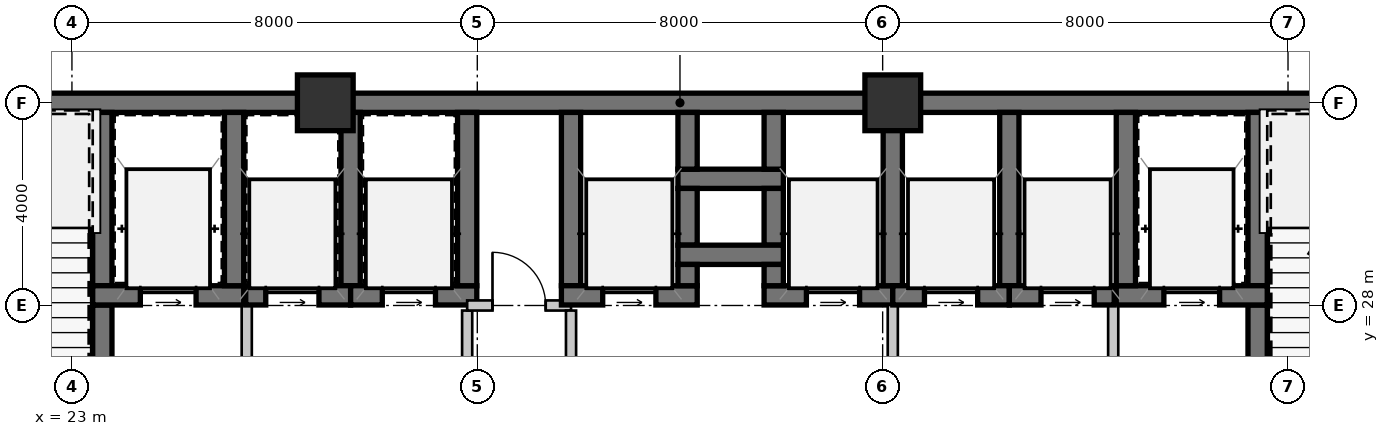
"""IFC4 building model, lengths in metres.
Left out: names, types, materials, properties, quantities, classifications, styles, units other than length and angle.
Written with IfcOpenShell. Run it as: python <this file> out.ifc"""

import sys

from ifc_helpers import new_model, si_unit, direction, frame, frame_2d, origin, origin_2d, place, context, subcontext, project, spatial, rectangle, extrude, source, transform, mapped, element, fill, save


model = new_model("IFC4")
c1 = context("Model", 3, precision=1e-05, world=origin(), true_north=direction((0.0, 1.0)))
c2 = subcontext(c1, "Body", "Model", "MODEL_VIEW")
j1 = project(units=[si_unit("LENGTHUNIT", "METRE"), si_unit("PLANEANGLEUNIT", "RADIAN")], contexts=[c1])
p1 = place(None, origin())
s1 = spatial("IfcSite", under=j1, at=p1, CompositionType="ELEMENT")
p2 = place(p1, origin())
s2 = spatial("IfcBuilding", under=s1, at=p2, CompositionType="ELEMENT")
p3 = place(p2, origin())
s3 = spatial("IfcBuildingStorey", under=s2, at=p3, CompositionType="ELEMENT", Elevation=0.0)
m1 = source(origin(), c2, "Body", "SweptSolid", [
    extrude(rectangle(XDim=1.1, YDim=1.1, at=origin_2d()), origin(), (0.0, 0.0, 1.0), 4.55),
])
for number, where, z_axis, x_axis in (
    (1, (28.0, 32.0, 0.0), (0.0, 0.0, 1.0), (1.0, 0.0, 0.0)),
    (2, (39.2, 32.0, 0.0), (0.0, 0.0, 1.0), (1.0, 0.0, 0.0)),
):
    element("IfcColumn", number, at=place(p3, frame(where, z_axis=z_axis, x_axis=x_axis)), inside=s3, PredefinedType="COLUMN", context=c2, shape_type="MappedRepresentation", body=[
        mapped(m1, transform((0.0, 0.0, 0.0), scale=1.0)),
    ])
m2 = source(origin(), c2, "Body", "SweptSolid", [
    extrude(rectangle(XDim=9.19, YDim=0.38, at=frame_2d((4.595, 0.0))), origin(), (0.0, 0.0, 1.0), 4.29),
])
p4 = place(p3, frame((18.81, 32.0, 0.0), z_axis=(0.0, 0.0, 1.0), x_axis=(1.0, 0.0, 0.0)))
e3 = element("IfcWall", 3, at=p4, inside=s3, PredefinedType="SHEAR", context=c2, shape_type="MappedRepresentation", body=[
    mapped(m2, transform((0.0, 0.0, 0.0), scale=1.0)),
])
m3 = source(origin(), c2, "Body", "SweptSolid", [
    extrude(rectangle(XDim=11.2, YDim=0.38, at=frame_2d((5.6, 0.0))), origin(), (0.0, 0.0, 1.0), 4.29),
])
p5 = place(p3, frame((28.0, 32.0, 0.0), z_axis=(0.0, 0.0, 1.0), x_axis=(1.0, 0.0, 0.0)))
e4 = element("IfcWall", 4, at=p5, inside=s3, PredefinedType="SHEAR", context=c2, shape_type="MappedRepresentation", body=[
    mapped(m3, transform((0.0, 0.0, 0.0), scale=1.0)),
])
m4 = source(origin(), c2, "Body", "SweptSolid", [
    extrude(rectangle(XDim=11.99, YDim=0.38, at=frame_2d((5.995, 0.0))), origin(), (0.0, 0.0, 1.0), 4.29),
])
p6 = place(p3, frame((39.2, 32.0, 0.0), z_axis=(0.0, 0.0, 1.0), x_axis=(1.0, 0.0, 0.0)))
e5 = element("IfcWall", 5, at=p6, inside=s3, PredefinedType="SHEAR", context=c2, shape_type="MappedRepresentation", body=[
    mapped(m4, transform((0.0, 0.0, 0.0), scale=1.0)),
])
m5 = source(origin(), c2, "Body", "SweptSolid", [
    extrude(rectangle(XDim=3.42, YDim=0.38, at=frame_2d((1.71, 0.0))), origin(), (0.0, 0.0, 1.0), 4.29),
])
p7 = place(p3, frame((23.6, 28.39, 0.0), z_axis=(0.0, 0.0, 1.0), x_axis=(0.0, 1.0, 0.0)))
e6 = element("IfcWall", 6, at=p7, inside=s3, PredefinedType="SHEAR", context=c2, shape_type="MappedRepresentation", body=[
    mapped(m5, transform((0.0, 0.0, 0.0), scale=1.0)),
])
m6 = source(origin(), c2, "Body", "SweptSolid", [
    extrude(rectangle(XDim=3.82, YDim=0.38, at=frame_2d((1.91, 0.0))), origin(), (0.0, 0.0, 1.0), 4.29),
])
p8 = place(p3, frame((23.6, 24.19, 0.0), z_axis=(0.0, 0.0, 1.0), x_axis=(0.0, 1.0, 0.0)))
e7 = element("IfcWall", 7, at=p8, inside=s3, PredefinedType="SHEAR", context=c2, shape_type="MappedRepresentation", body=[
    mapped(m6, transform((0.0, 0.0, 0.0), scale=1.0)),
])
m7 = source(origin(), c2, "Body", "SweptSolid", [
    extrude(rectangle(XDim=1.05, YDim=2.1, at=frame_2d((0.525, 1.05))), frame((0.0, 0.2, 0.0), z_axis=(0.0, -1.0, 0.0), x_axis=(1.0, 0.0, 0.0)), (0.0, 0.0, 1.0), 0.4),
])
p9 = place(p8, frame((0.685, 0.0, 0.0)))
e8 = element("IfcOpeningElement", 8, at=p9, cuts=e7, PredefinedType="OPENING", context=c2, shape_type="MappedRepresentation", body=[
    mapped(m7, transform((0.0, 0.0, 0.0), scale=1.0)),
])
m8 = source(origin(), c2, "Body", "SweptSolid", [
    extrude(rectangle(XDim=2.98, YDim=0.38, at=frame_2d((1.49, 0.0))), origin(), (0.0, 0.0, 1.0), 4.29),
])
p10 = place(p3, frame((23.41, 28.2, 0.0), z_axis=(0.0, 0.0, 1.0), x_axis=(1.0, 0.0, 0.0)))
e9 = element("IfcWall", 9, at=p10, inside=s3, PredefinedType="SHEAR", context=c2, shape_type="MappedRepresentation", body=[
    mapped(m8, transform((0.0, 0.0, 0.0), scale=1.0)),
])
m9 = source(origin(), c2, "Body", "SweptSolid", [
    extrude(rectangle(XDim=1.1, YDim=2.15, at=frame_2d((0.55, 1.075))), frame((0.0, 0.2, 0.0), z_axis=(0.0, -1.0, 0.0), x_axis=(1.0, 0.0, 0.0)), (0.0, 0.0, 1.0), 0.4),
])
p11 = place(p10, frame((0.94, 0.0, 0.0)))
e10 = element("IfcOpeningElement", 10, at=p11, cuts=e9, PredefinedType="OPENING", context=c2, shape_type="MappedRepresentation", body=[
    mapped(m9, transform((0.0, 0.0, 0.0), scale=1.0)),
])
p12 = place(p3, frame((26.2, 28.39, 0.0), z_axis=(0.0, 0.0, 1.0), x_axis=(0.0, 1.0, 0.0)))
e11 = element("IfcWall", 11, at=p12, inside=s3, PredefinedType="SHEAR", context=c2, shape_type="MappedRepresentation", body=[
    mapped(m5, transform((0.0, 0.0, 0.0), scale=1.0)),
])
m10 = source(origin(), c2, "Body", "SweptSolid", [
    extrude(rectangle(XDim=3.91, YDim=0.2, at=frame_2d((1.955, 0.0))), origin(), (0.0, 0.0, 1.0), 4.29),
])
p13 = place(p3, frame((26.45, 24.1, 0.0), z_axis=(0.0, 0.0, 1.0), x_axis=(0.0, 1.0, 0.0)))
e12 = element("IfcWall", 12, at=p13, inside=s3, PredefinedType="SOLIDWALL", context=c2, shape_type="MappedRepresentation", body=[
    mapped(m10, transform((0.0, 0.0, 0.0), scale=1.0)),
])
p14 = place(p3, frame((46.4, 31.81, 0.0), z_axis=(0.0, 0.0, 1.0), x_axis=(0.0, -1.0, 0.0)))
e13 = element("IfcWall", 13, at=p14, inside=s3, PredefinedType="SHEAR", context=c2, shape_type="MappedRepresentation", body=[
    mapped(m5, transform((0.0, 0.0, 0.0), scale=1.0)),
])
p15 = place(p3, frame((46.4, 28.01, 0.0), z_axis=(0.0, 0.0, 1.0), x_axis=(0.0, -1.0, 0.0)))
e14 = element("IfcWall", 14, at=p15, inside=s3, PredefinedType="SHEAR", context=c2, shape_type="MappedRepresentation", body=[
    mapped(m6, transform((0.0, 0.0, 0.0), scale=1.0)),
])
p16 = place(p15, frame((2.085, 0.0, 0.0)))
e15 = element("IfcOpeningElement", 15, at=p16, cuts=e14, PredefinedType="OPENING", context=c2, shape_type="MappedRepresentation", body=[
    mapped(m7, transform((0.0, 0.0, 0.0), scale=1.0)),
])
p17 = place(p3, frame((43.61, 28.2, 0.0), z_axis=(0.0, 0.0, 1.0), x_axis=(1.0, 0.0, 0.0)))
e16 = element("IfcWall", 16, at=p17, inside=s3, PredefinedType="SHEAR", context=c2, shape_type="MappedRepresentation", body=[
    mapped(m8, transform((0.0, 0.0, 0.0), scale=1.0)),
])
p18 = place(p17, frame((0.94, 0.0, 0.0)))
e17 = element("IfcOpeningElement", 17, at=p18, cuts=e16, PredefinedType="OPENING", context=c2, shape_type="MappedRepresentation", body=[
    mapped(m9, transform((0.0, 0.0, 0.0), scale=1.0)),
])
p19 = place(p3, frame((43.8, 31.81, 0.0), z_axis=(0.0, 0.0, 1.0), x_axis=(0.0, -1.0, 0.0)))
e18 = element("IfcWall", 18, at=p19, inside=s3, PredefinedType="SHEAR", context=c2, shape_type="MappedRepresentation", body=[
    mapped(m5, transform((0.0, 0.0, 0.0), scale=1.0)),
])
p20 = place(p3, frame((43.55, 28.01, 0.0), z_axis=(0.0, 0.0, 1.0), x_axis=(0.0, -1.0, 0.0)))
e19 = element("IfcWall", 19, at=p20, inside=s3, PredefinedType="SOLIDWALL", context=c2, shape_type="MappedRepresentation", body=[
    mapped(m10, transform((0.0, 0.0, 0.0), scale=1.0)),
])
m11 = source(origin(), c2, "Body", "SweptSolid", [
    extrude(rectangle(XDim=2.08, YDim=0.38, at=frame_2d((1.04, 0.0))), origin(), (0.0, 0.0, 1.0), 4.29),
])
p21 = place(p3, frame((34.96, 30.5, 0.0), z_axis=(0.0, 0.0, 1.0), x_axis=(1.0, 0.0, 0.0)))
e20 = element("IfcWall", 20, at=p21, inside=s3, PredefinedType="SHEAR", context=c2, shape_type="MappedRepresentation", body=[
    mapped(m11, transform((0.0, 0.0, 0.0), scale=1.0)),
])
m12 = source(origin(), c2, "Body", "SweptSolid", [
    extrude(rectangle(XDim=1.12, YDim=0.38, at=frame_2d((0.56, 0.0))), origin(), (0.0, 0.0, 1.0), 4.29),
])
for number, where, z_axis, x_axis in (
    (21, (35.15, 31.81, 0.0), (0.0, 0.0, 1.0), (0.0, -1.0, 0.0)),
    (22, (36.85, 30.69, 0.0), (0.0, 0.0, 1.0), (0.0, 1.0, 0.0)),
    (23, (35.15, 30.31, 0.0), (0.0, 0.0, 1.0), (0.0, -1.0, 0.0)),
    (24, (36.85, 29.19, 0.0), (0.0, 0.0, 1.0), (0.0, 1.0, 0.0)),
):
    element("IfcWall", number, at=place(p3, frame(where, z_axis=z_axis, x_axis=x_axis)), inside=s3, PredefinedType="SHEAR", context=c2, shape_type="MappedRepresentation", body=[
        mapped(m12, transform((0.0, 0.0, 0.0), scale=1.0)),
    ])
p22 = place(p3, frame((34.96, 29.0, 0.0), z_axis=(0.0, 0.0, 1.0), x_axis=(1.0, 0.0, 0.0)))
e25 = element("IfcWall", 25, at=p22, inside=s3, PredefinedType="SHEAR", context=c2, shape_type="MappedRepresentation", body=[
    mapped(m11, transform((0.0, 0.0, 0.0), scale=1.0)),
])
p23 = place(p3, frame((28.5, 28.39, 0.0), z_axis=(0.0, 0.0, 1.0), x_axis=(0.0, 1.0, 0.0)))
e26 = element("IfcWall", 26, at=p23, inside=s3, PredefinedType="SHEAR", context=c2, shape_type="MappedRepresentation", body=[
    mapped(m5, transform((0.0, 0.0, 0.0), scale=1.0)),
])
m13 = source(origin(), c2, "Body", "SweptSolid", [
    extrude(rectangle(XDim=2.07, YDim=0.38, at=frame_2d((1.035, 0.0))), origin(), (0.0, 0.0, 1.0), 4.29),
])
p24 = place(p3, frame((26.43, 28.2, 0.0), z_axis=(0.0, 0.0, 1.0), x_axis=(1.0, 0.0, 0.0)))
e27 = element("IfcWall", 27, at=p24, inside=s3, PredefinedType="SHEAR", context=c2, shape_type="MappedRepresentation", body=[
    mapped(m13, transform((0.0, 0.0, 0.0), scale=1.0)),
])
m14 = source(origin(), c2, "Body", "SweptSolid", [
    extrude(rectangle(XDim=1.05, YDim=2.15, at=frame_2d((0.525, 1.075))), frame((0.0, 0.2, 0.0), z_axis=(0.0, -1.0, 0.0), x_axis=(1.0, 0.0, 0.0)), (0.0, 0.0, 1.0), 0.4),
])
p25 = place(p24, frame((0.395, 0.0, 0.0)))
e28 = element("IfcOpeningElement", 28, at=p25, cuts=e27, PredefinedType="OPENING", context=c2, shape_type="MappedRepresentation", body=[
    mapped(m14, transform((0.0, 0.0, 0.0), scale=1.0)),
])
m15 = source(origin(), c2, "Body", "SweptSolid", [
    extrude(rectangle(XDim=2.49, YDim=0.38, at=frame_2d((1.245, 0.0))), origin(), (0.0, 0.0, 1.0), 4.29),
])
p26 = place(p3, frame((28.5, 28.2, 0.0), z_axis=(0.0, 0.0, 1.0), x_axis=(1.0, 0.0, 0.0)))
e29 = element("IfcWall", 29, at=p26, inside=s3, PredefinedType="SHEAR", context=c2, shape_type="MappedRepresentation", body=[
    mapped(m15, transform((0.0, 0.0, 0.0), scale=1.0)),
])
p27 = place(p26, frame((0.625, 0.0, 0.0)))
e30 = element("IfcOpeningElement", 30, at=p27, cuts=e29, PredefinedType="OPENING", context=c2, shape_type="MappedRepresentation", body=[
    mapped(m14, transform((0.0, 0.0, 0.0), scale=1.0)),
])
p28 = place(p3, frame((30.8, 28.39, 0.0), z_axis=(0.0, 0.0, 1.0), x_axis=(0.0, 1.0, 0.0)))
e31 = element("IfcWall", 31, at=p28, inside=s3, PredefinedType="SHEAR", context=c2, shape_type="MappedRepresentation", body=[
    mapped(m5, transform((0.0, 0.0, 0.0), scale=1.0)),
])
m16 = source(origin(), c2, "Body", "SweptSolid", [
    extrude(rectangle(XDim=3.8, YDim=0.2, at=frame_2d((1.9, 0.0))), origin(), (0.0, 0.0, 1.0), 4.29),
])
p29 = place(p3, frame((30.8, 27.9, 0.0), z_axis=(0.0, 0.0, 1.0), x_axis=(0.0, -1.0, 0.0)))
e32 = element("IfcWall", 32, at=p29, inside=s3, PredefinedType="SOLIDWALL", context=c2, shape_type="MappedRepresentation", body=[
    mapped(m16, transform((0.0, 0.0, 0.0), scale=1.0)),
])
m17 = source(origin(), c2, "Body", "SweptSolid", [
    extrude(rectangle(XDim=2.05, YDim=0.2, at=frame_2d((1.025, 0.0))), origin(), (0.0, 0.0, 1.0), 4.29),
])
p30 = place(p3, frame((30.8, 28.0, 0.0), z_axis=(0.0, 0.0, 1.0), x_axis=(1.0, 0.0, 0.0)))
e33 = element("IfcWall", 33, at=p30, inside=s3, PredefinedType="SOLIDWALL", context=c2, shape_type="MappedRepresentation", body=[
    mapped(m17, transform((0.0, 0.0, 0.0), scale=1.0)),
])
m18 = source(origin(), c2, "Body", "SweptSolid", [
    extrude(rectangle(XDim=1.05, YDim=2.1, at=frame_2d((0.525, 1.05))), frame((0.0, 0.11, 0.0), z_axis=(0.0, -1.0, 0.0), x_axis=(1.0, 0.0, 0.0)), (0.0, 0.0, 1.0), 0.22),
])
p31 = place(p30, frame((0.5, 0.0, 0.0)))
e34 = element("IfcOpeningElement", 34, at=p31, cuts=e33, PredefinedType="OPENING", context=c2, shape_type="MappedRepresentation", body=[
    mapped(m18, transform((0.0, 0.0, 0.0), scale=1.0)),
])
p32 = place(p3, frame((32.85, 27.9, 0.0), z_axis=(0.0, 0.0, 1.0), x_axis=(0.0, -1.0, 0.0)))
e35 = element("IfcWall", 35, at=p32, inside=s3, PredefinedType="SOLIDWALL", context=c2, shape_type="MappedRepresentation", body=[
    mapped(m16, transform((0.0, 0.0, 0.0), scale=1.0)),
])
p33 = place(p3, frame((32.85, 31.81, 0.0), z_axis=(0.0, 0.0, 1.0), x_axis=(0.0, -1.0, 0.0)))
e36 = element("IfcWall", 36, at=p33, inside=s3, PredefinedType="SHEAR", context=c2, shape_type="MappedRepresentation", body=[
    mapped(m5, transform((0.0, 0.0, 0.0), scale=1.0)),
])
m19 = source(origin(), c2, "Body", "SweptSolid", [
    extrude(rectangle(XDim=2.68, YDim=0.38, at=frame_2d((1.34, 0.0))), origin(), (0.0, 0.0, 1.0), 4.29),
])
p34 = place(p3, frame((32.66, 28.2, 0.0), z_axis=(0.0, 0.0, 1.0), x_axis=(1.0, 0.0, 0.0)))
e37 = element("IfcWall", 37, at=p34, inside=s3, PredefinedType="SHEAR", context=c2, shape_type="MappedRepresentation", body=[
    mapped(m19, transform((0.0, 0.0, 0.0), scale=1.0)),
])
p35 = place(p34, frame((0.815, 0.0, 0.0)))
e38 = element("IfcOpeningElement", 38, at=p35, cuts=e37, PredefinedType="OPENING", context=c2, shape_type="MappedRepresentation", body=[
    mapped(m14, transform((0.0, 0.0, 0.0), scale=1.0)),
])
m20 = source(origin(), c2, "Body", "SweptSolid", [
    extrude(rectangle(XDim=0.42, YDim=0.38, at=frame_2d((0.21, 0.0))), origin(), (0.0, 0.0, 1.0), 4.29),
])
p36 = place(p3, frame((35.15, 28.39, 0.0), z_axis=(0.0, 0.0, 1.0), x_axis=(0.0, 1.0, 0.0)))
e39 = element("IfcWall", 39, at=p36, inside=s3, PredefinedType="SHEAR", context=c2, shape_type="MappedRepresentation", body=[
    mapped(m20, transform((0.0, 0.0, 0.0), scale=1.0)),
])
m21 = source(origin(), c2, "Body", "SweptSolid", [
    extrude(rectangle(XDim=2.54, YDim=0.38, at=frame_2d((1.27, 0.0))), origin(), (0.0, 0.0, 1.0), 4.29),
])
p37 = place(p3, frame((36.66, 28.2, 0.0), z_axis=(0.0, 0.0, 1.0), x_axis=(1.0, 0.0, 0.0)))
e40 = element("IfcWall", 40, at=p37, inside=s3, PredefinedType="SHEAR", context=c2, shape_type="MappedRepresentation", body=[
    mapped(m21, transform((0.0, 0.0, 0.0), scale=1.0)),
])
p38 = place(p37, frame((0.835, 0.0, 0.0)))
e41 = element("IfcOpeningElement", 41, at=p38, cuts=e40, PredefinedType="OPENING", context=c2, shape_type="MappedRepresentation", body=[
    mapped(m14, transform((0.0, 0.0, 0.0), scale=1.0)),
])
p39 = place(p3, frame((36.85, 28.81, 0.0), z_axis=(0.0, 0.0, 1.0), x_axis=(0.0, -1.0, 0.0)))
e42 = element("IfcWall", 42, at=p39, inside=s3, PredefinedType="SHEAR", context=c2, shape_type="MappedRepresentation", body=[
    mapped(m20, transform((0.0, 0.0, 0.0), scale=1.0)),
])
p40 = place(p3, frame((39.2, 28.39, 0.0), z_axis=(0.0, 0.0, 1.0), x_axis=(0.0, 1.0, 0.0)))
e43 = element("IfcWall", 43, at=p40, inside=s3, PredefinedType="SHEAR", context=c2, shape_type="MappedRepresentation", body=[
    mapped(m5, transform((0.0, 0.0, 0.0), scale=1.0)),
])
m22 = source(origin(), c2, "Body", "SweptSolid", [
    extrude(rectangle(XDim=3.91, YDim=0.2, at=frame_2d((1.955, 0.0))), origin(), (0.0, 0.0, 1.0), 3.83),
])
p41 = place(p3, frame((39.2, 28.01, 0.0), z_axis=(0.0, 0.0, 1.0), x_axis=(0.0, -1.0, 0.0)))
e44 = element("IfcWall", 44, at=p41, inside=s3, PredefinedType="SOLIDWALL", context=c2, shape_type="MappedRepresentation", body=[
    mapped(m22, transform((0.0, 0.0, 0.0), scale=1.0)),
])
p42 = place(p3, frame((41.5, 28.39, 0.0), z_axis=(0.0, 0.0, 1.0), x_axis=(0.0, 1.0, 0.0)))
e45 = element("IfcWall", 45, at=p42, inside=s3, PredefinedType="SHEAR", context=c2, shape_type="MappedRepresentation", body=[
    mapped(m5, transform((0.0, 0.0, 0.0), scale=1.0)),
])
m23 = source(origin(), c2, "Body", "SweptSolid", [
    extrude(rectangle(XDim=2.3, YDim=0.38, at=frame_2d((1.15, 0.0))), origin(), (0.0, 0.0, 1.0), 4.29),
])
p43 = place(p3, frame((39.2, 28.2, 0.0), z_axis=(0.0, 0.0, 1.0), x_axis=(1.0, 0.0, 0.0)))
e46 = element("IfcWall", 46, at=p43, inside=s3, PredefinedType="SHEAR", context=c2, shape_type="MappedRepresentation", body=[
    mapped(m23, transform((0.0, 0.0, 0.0), scale=1.0)),
])
p44 = place(p43, frame((0.625, 0.0, 0.0)))
e47 = element("IfcOpeningElement", 47, at=p44, cuts=e46, PredefinedType="OPENING", context=c2, shape_type="MappedRepresentation", body=[
    mapped(m14, transform((0.0, 0.0, 0.0), scale=1.0)),
])
p45 = place(p3, frame((41.5, 28.2, 0.0), z_axis=(0.0, 0.0, 1.0), x_axis=(1.0, 0.0, 0.0)))
e48 = element("IfcWall", 48, at=p45, inside=s3, PredefinedType="SHEAR", context=c2, shape_type="MappedRepresentation", body=[
    mapped(m13, transform((0.0, 0.0, 0.0), scale=1.0)),
])
p46 = place(p45, frame((0.625, 0.0, 0.0)))
e49 = element("IfcOpeningElement", 49, at=p46, cuts=e48, PredefinedType="OPENING", context=c2, shape_type="MappedRepresentation", body=[
    mapped(m14, transform((0.0, 0.0, 0.0), scale=1.0)),
])
m24 = source(origin(), c2, "Body", "SweptSolid", [
    extrude(rectangle(XDim=1.1, YDim=2.15, at=frame_2d((0.55, 1.075))), frame((0.0, 0.025, 0.0), z_axis=(0.0, -1.0, 0.0), x_axis=(1.0, 0.0, 0.0)), (0.0, 0.0, 1.0), 0.05),
])
p47 = place(p11, origin())
e50 = element("IfcDoor", 50, at=p47, inside=s3, OperationType="SLIDING_TO_LEFT", PredefinedType="DOOR", context=c2, shape_type="MappedRepresentation", body=[
    mapped(m24, transform((0.0, 0.0, 0.0), scale=1.0)),
])
fill(e10, e50)
p48 = place(p18, origin())
e51 = element("IfcDoor", 51, at=p48, inside=s3, OperationType="SLIDING_TO_LEFT", PredefinedType="DOOR", context=c2, shape_type="MappedRepresentation", body=[
    mapped(m24, transform((0.0, 0.0, 0.0), scale=1.0)),
])
fill(e17, e51)
m25 = source(origin(), c2, "Body", "SweptSolid", [
    extrude(rectangle(XDim=1.05, YDim=2.15, at=frame_2d((0.525, 1.075))), frame((0.0, 0.025, 0.0), z_axis=(0.0, -1.0, 0.0), x_axis=(1.0, 0.0, 0.0)), (0.0, 0.0, 1.0), 0.05),
])
p49 = place(p25, origin())
e52 = element("IfcDoor", 52, at=p49, inside=s3, OperationType="SLIDING_TO_LEFT", PredefinedType="DOOR", context=c2, shape_type="MappedRepresentation", body=[
    mapped(m25, transform((0.0, 0.0, 0.0), scale=1.0)),
])
fill(e28, e52)
p50 = place(p27, origin())
e53 = element("IfcDoor", 53, at=p50, inside=s3, OperationType="SLIDING_TO_LEFT", PredefinedType="DOOR", context=c2, shape_type="MappedRepresentation", body=[
    mapped(m25, transform((0.0, 0.0, 0.0), scale=1.0)),
])
fill(e30, e53)
m26 = source(origin(), c2, "Body", "SweptSolid", [
    extrude(rectangle(XDim=1.05, YDim=2.1, at=frame_2d((0.525, 1.05))), frame((0.0, 0.025, 0.0), z_axis=(0.0, -1.0, 0.0), x_axis=(1.0, 0.0, 0.0)), (0.0, 0.0, 1.0), 0.05),
])
p51 = place(p31, origin())
e54 = element("IfcDoor", 54, at=p51, inside=s3, OperationType="SINGLE_SWING_LEFT", PredefinedType="DOOR", context=c2, shape_type="MappedRepresentation", body=[
    mapped(m26, transform((0.0, 0.0, 0.0), scale=1.0)),
])
fill(e34, e54)
p52 = place(p35, origin())
e55 = element("IfcDoor", 55, at=p52, inside=s3, OperationType="SLIDING_TO_LEFT", PredefinedType="DOOR", context=c2, shape_type="MappedRepresentation", body=[
    mapped(m25, transform((0.0, 0.0, 0.0), scale=1.0)),
])
fill(e38, e55)
p53 = place(p38, origin())
e56 = element("IfcDoor", 56, at=p53, inside=s3, OperationType="SLIDING_TO_LEFT", PredefinedType="DOOR", context=c2, shape_type="MappedRepresentation", body=[
    mapped(m25, transform((0.0, 0.0, 0.0), scale=1.0)),
])
fill(e41, e56)
p54 = place(p44, origin())
e57 = element("IfcDoor", 57, at=p54, inside=s3, OperationType="SLIDING_TO_LEFT", PredefinedType="DOOR", context=c2, shape_type="MappedRepresentation", body=[
    mapped(m25, transform((0.0, 0.0, 0.0), scale=1.0)),
])
fill(e47, e57)
p55 = place(p46, origin())
e58 = element("IfcDoor", 58, at=p55, inside=s3, OperationType="SLIDING_TO_LEFT", PredefinedType="DOOR", context=c2, shape_type="MappedRepresentation", body=[
    mapped(m25, transform((0.0, 0.0, 0.0), scale=1.0)),
])
fill(e49, e58)
save(model, sys.argv[1])
